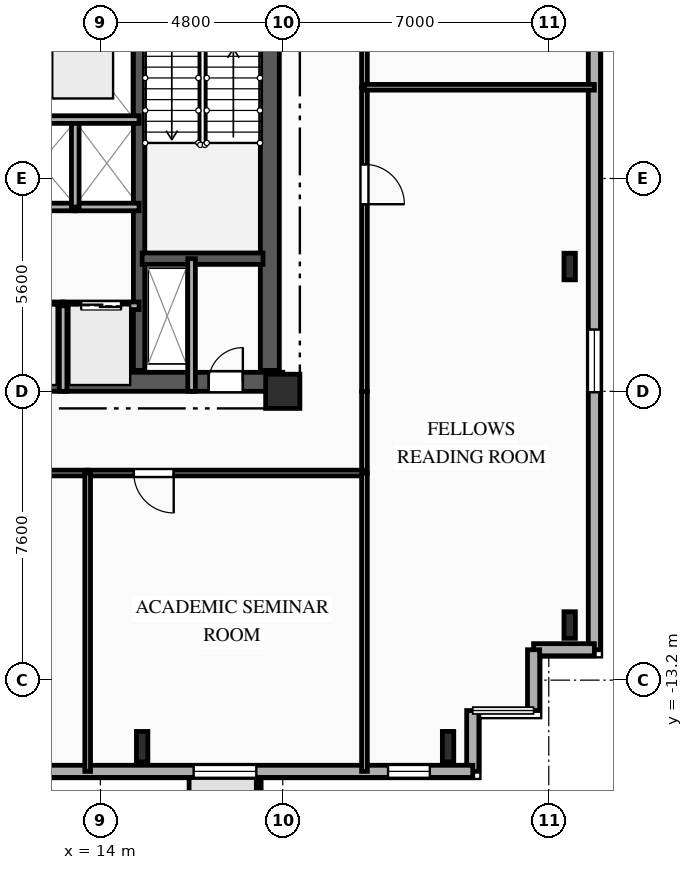
"""IFC4 building model, lengths in metres.
Left out: names, types, materials, properties, quantities, classifications, styles, units other than length and angle.
Written with IfcOpenShell. Run it as: python <this file> out.ifc"""

import sys

from ifc_helpers import new_model, si_unit, direction, frame, frame_2d, origin, origin_2d, place, context, subcontext, project, spatial, rectangle, i_section, extrude, element, fill, save


model = new_model("IFC4")
c1 = context("Model", 3, precision=1e-05, world=origin(), true_north=direction((0.0, 1.0)))
c2 = subcontext(c1, "Body", "Model", "MODEL_VIEW")
j1 = project(units=[si_unit("LENGTHUNIT", "METRE"), si_unit("PLANEANGLEUNIT", "RADIAN")], contexts=[c1])
p1 = place(None, origin())
s1 = spatial("IfcSite", under=j1, at=p1, CompositionType="ELEMENT")
p2 = place(p1, origin())
s2 = spatial("IfcBuilding", under=s1, at=p2, CompositionType="ELEMENT")
p3 = place(p2, frame((0.0, 0.0, 171.2)))
s3 = spatial("IfcBuildingStorey", under=s2, at=p3, CompositionType="ELEMENT", Elevation=171.2)
p4 = place(p3, frame((18.8, -5.6, 0.0), z_axis=(0.0, 0.0, 1.0), x_axis=(1.0, 0.0, 0.0)))
e1 = element("IfcColumn", 1, at=p4, inside=s3, PredefinedType="COLUMN", context=c2, shape_type="SweptSolid", body=[
    extrude(rectangle(XDim=0.9, YDim=0.9, at=origin_2d()), origin(), (0.0, 0.0, 1.0), 3.35),
])
for number, where, z_axis, x_axis in (
    (2, (15.1, -14.95, 0.0), (0.0, 0.0, 1.0), (1.0, 0.0, 0.0)),
    (3, (23.15, -14.95, 0.0), (0.0, 0.0, 1.0), (1.0, 0.0, 0.0)),
):
    element("IfcColumn", number, at=place(p3, frame(where, z_axis=z_axis, x_axis=x_axis)), inside=s3, PredefinedType="COLUMN", context=c2, shape_type="SweptSolid", body=[
        extrude(i_section(OverallWidth=0.3, OverallDepth=0.8, WebThickness=0.018, FlangeThickness=0.033, FilletRadius=0.03, at=origin_2d()), origin(), (0.0, 0.0, 1.0), 3.35),
    ])
for number, where, z_axis, x_axis in (
    (4, (26.35, -11.75, 0.0), (0.0, 0.0, 1.0), (1.0, 0.0, 0.0)),
    (5, (26.35, -2.317, 0.0), (0.0, 0.0, 1.0), (1.0, 0.0, 0.0)),
):
    element("IfcColumn", number, at=place(p3, frame(where, z_axis=z_axis, x_axis=x_axis)), inside=s3, PredefinedType="COLUMN", context=c2, shape_type="SweptSolid", body=[
        extrude(i_section(OverallWidth=0.3, OverallDepth=0.7, WebThickness=0.017, FlangeThickness=0.032, FilletRadius=0.027, at=origin_2d()), origin(), (0.0, 0.0, 1.0), 3.35),
    ])
p5 = place(p3, frame((27.0, 17.2, 0.0), z_axis=(0.0, 0.0, 1.0), x_axis=(0.0, -1.0, 0.0)))
e6 = element("IfcWall", 6, at=p5, inside=s3, PredefinedType="SOLIDWALL", context=c2, shape_type="SweptSolid", body=[
    extrude(rectangle(XDim=29.6, YDim=0.32, at=frame_2d((14.8, 0.0))), origin(), (0.0, 0.0, 1.0), 3.0),
])
p6 = place(p5, frame((6.815, 0.0, 0.85)))
e7 = element("IfcOpeningElement", 7, at=p6, cuts=e6, PredefinedType="OPENING", context=c2, shape_type="SweptSolid", body=[
    extrude(rectangle(XDim=1.65, YDim=1.85, at=frame_2d((0.825, 0.925))), frame((0.0, 0.17, 0.0), z_axis=(0.0, -1.0, 0.0), x_axis=(1.0, 0.0, 0.0)), (0.0, 0.0, 1.0), 0.34),
])
p7 = place(p5, frame((21.175, 0.0, 0.85)))
e8 = element("IfcOpeningElement", 8, at=p7, cuts=e6, PredefinedType="OPENING", context=c2, shape_type="SweptSolid", body=[
    extrude(rectangle(XDim=1.65, YDim=1.85, at=frame_2d((0.825, 0.925))), frame((0.0, 0.17, 0.0), z_axis=(0.0, -1.0, 0.0), x_axis=(1.0, 0.0, 0.0)), (0.0, 0.0, 1.0), 0.34),
])
for number, where, z_axis, x_axis in (
    (9, (27.0, -12.4, 0.0), (0.0, 0.0, 1.0), (-1.0, 0.0, 0.0)),
    (10, (25.4, -12.4, 0.0), (0.0, 0.0, 1.0), (0.0, -1.0, 0.0)),
    (11, (23.8, -14.0, 0.0), (0.0, 0.0, 1.0), (0.0, -1.0, 0.0)),
):
    element("IfcWall", number, at=place(p3, frame(where, z_axis=z_axis, x_axis=x_axis)), inside=s3, PredefinedType="SOLIDWALL", context=c2, shape_type="SweptSolid", body=[
        extrude(rectangle(XDim=1.6, YDim=0.32, at=frame_2d((0.8, 0.0))), origin(), (0.0, 0.0, 1.0), 3.0),
    ])
p8 = place(p3, frame((23.8, -15.6, 0.0), z_axis=(0.0, 0.0, 1.0), x_axis=(-1.0, 0.0, 0.0)))
e12 = element("IfcWall", 12, at=p8, inside=s3, PredefinedType="SOLIDWALL", context=c2, shape_type="SweptSolid", body=[
    extrude(rectangle(XDim=49.6, YDim=0.32, at=frame_2d((24.8, 0.0))), origin(), (0.0, 0.0, 1.0), 3.0),
])
p9 = place(p8, frame((1.13, 0.0, 0.85)))
e13 = element("IfcOpeningElement", 13, at=p9, cuts=e12, PredefinedType="OPENING", context=c2, shape_type="SweptSolid", body=[
    extrude(rectangle(XDim=1.1, YDim=1.85, at=frame_2d((0.55, 0.925))), frame((0.0, 0.17, 0.0), z_axis=(0.0, -1.0, 0.0), x_axis=(1.0, 0.0, 0.0)), (0.0, 0.0, 1.0), 0.34),
])
p10 = place(p8, frame((5.695, 0.0, 0.85)))
e14 = element("IfcOpeningElement", 14, at=p10, cuts=e12, PredefinedType="OPENING", context=c2, shape_type="SweptSolid", body=[
    extrude(rectangle(XDim=1.65, YDim=1.85, at=frame_2d((0.825, 0.925))), frame((0.0, 0.17, 0.0), z_axis=(0.0, -1.0, 0.0), x_axis=(1.0, 0.0, 0.0)), (0.0, 0.0, 1.0), 0.34),
])
p11 = place(p8, frame((12.975, 0.0, 0.85)))
e15 = element("IfcOpeningElement", 15, at=p11, cuts=e12, PredefinedType="OPENING", context=c2, shape_type="SweptSolid", body=[
    extrude(rectangle(XDim=1.65, YDim=1.85, at=frame_2d((0.825, 0.925))), frame((0.0, 0.17, 0.0), z_axis=(0.0, -1.0, 0.0), x_axis=(1.0, 0.0, 0.0)), (0.0, 0.0, 1.0), 0.34),
])
p12 = place(p8, frame((21.636, 0.0, 0.85)))
e16 = element("IfcOpeningElement", 16, at=p12, cuts=e12, PredefinedType="OPENING", context=c2, shape_type="SweptSolid", body=[
    extrude(rectangle(XDim=2.2, YDim=1.85, at=frame_2d((1.1, 0.925))), frame((0.0, 0.17, 0.0), z_axis=(0.0, -1.0, 0.0), x_axis=(1.0, 0.0, 0.0)), (0.0, 0.0, 1.0), 0.34),
])
p13 = place(p8, frame((33.935, 0.0, 0.85)))
e17 = element("IfcOpeningElement", 17, at=p13, cuts=e12, PredefinedType="OPENING", context=c2, shape_type="SweptSolid", body=[
    extrude(rectangle(XDim=1.65, YDim=1.85, at=frame_2d((0.825, 0.925))), frame((0.0, 0.17, 0.0), z_axis=(0.0, -1.0, 0.0), x_axis=(1.0, 0.0, 0.0)), (0.0, 0.0, 1.0), 0.34),
])
p14 = place(p8, frame((41.24, 0.0, 0.85)))
e18 = element("IfcOpeningElement", 18, at=p14, cuts=e12, PredefinedType="OPENING", context=c2, shape_type="SweptSolid", body=[
    extrude(rectangle(XDim=1.65, YDim=1.85, at=frame_2d((0.825, 0.925))), frame((0.0, 0.17, 0.0), z_axis=(0.0, -1.0, 0.0), x_axis=(1.0, 0.0, 0.0)), (0.0, 0.0, 1.0), 0.34),
])
p15 = place(p8, frame((46.175, 0.0, 0.85)))
e19 = element("IfcOpeningElement", 19, at=p15, cuts=e12, PredefinedType="OPENING", context=c2, shape_type="SweptSolid", body=[
    extrude(rectangle(XDim=1.65, YDim=1.85, at=frame_2d((0.825, 0.925))), frame((0.0, 0.17, 0.0), z_axis=(0.0, -1.0, 0.0), x_axis=(1.0, 0.0, 0.0)), (0.0, 0.0, 1.0), 0.34),
])
p16 = place(p3, frame((9.2, -5.35, 0.0), z_axis=(0.0, 0.0, 1.0), x_axis=(1.0, 0.0, 0.0)))
e20 = element("IfcWall", 20, at=p16, inside=s3, PredefinedType="SHEAR", context=c2, shape_type="SweptSolid", body=[
    extrude(rectangle(XDim=9.6, YDim=0.5, at=frame_2d((4.8, 0.0))), origin(), (0.0, 0.0, 1.0), 3.0),
])
p17 = place(p16, frame((7.65, 0.0, 0.0)))
e21 = element("IfcOpeningElement", 21, at=p17, cuts=e20, PredefinedType="OPENING", context=c2, shape_type="SweptSolid", body=[
    extrude(rectangle(XDim=0.9, YDim=2.1, at=frame_2d((0.45, 1.05))), frame((0.0, 0.26, 0.0), z_axis=(0.0, -1.0, 0.0), x_axis=(1.0, 0.0, 0.0)), (0.0, 0.0, 1.0), 0.52),
])
p18 = place(p3, frame((18.46, -5.05, 0.0), z_axis=(0.0, 0.0, 1.0), x_axis=(0.0, 1.0, 0.0)))
e22 = element("IfcWall", 22, at=p18, inside=s3, PredefinedType="SHEAR", context=c2, shape_type="SweptSolid", body=[
    extrude(rectangle(XDim=10.1, YDim=0.5, at=frame_2d((5.05, 0.0))), origin(), (0.0, 0.0, 1.0), 3.0),
])
p19 = place(p3, frame((15.02, -5.05, 0.0), z_axis=(0.0, 0.0, 1.0), x_axis=(0.0, 1.0, 0.0)))
e23 = element("IfcWall", 23, at=p19, inside=s3, PredefinedType="SHEAR", context=c2, shape_type="SweptSolid", body=[
    extrude(rectangle(XDim=10.1, YDim=0.3, at=frame_2d((5.05, 0.0))), origin(), (0.0, 0.0, 1.0), 3.0),
])
p20 = place(p3, frame((15.1, -2.11, 0.0), z_axis=(0.0, 0.0, 1.0), x_axis=(1.0, 0.0, 0.0)))
e24 = element("IfcWall", 24, at=p20, inside=s3, PredefinedType="SHEAR", context=c2, shape_type="SweptSolid", body=[
    extrude(rectangle(XDim=3.18, YDim=0.3, at=frame_2d((1.59, 0.0))), origin(), (0.0, 0.0, 1.0), 3.0),
])
p21 = place(p3, frame((16.4, -2.11, 0.0), z_axis=(0.0, 0.0, 1.0), x_axis=(0.0, -1.0, 0.0)))
e25 = element("IfcWall", 25, at=p21, inside=s3, PredefinedType="PARTITIONING", context=c2, shape_type="SweptSolid", body=[
    extrude(rectangle(XDim=3.49, YDim=0.2, at=frame_2d((1.745, 0.0))), origin(), (0.0, 0.0, 1.0), 3.0),
])
p22 = place(p3, frame((11.08, -3.35, 0.0), z_axis=(0.0, 0.0, 1.0), x_axis=(1.0, 0.0, 0.0)))
e26 = element("IfcWall", 26, at=p22, inside=s3, PredefinedType="PARTITIONING", context=c2, shape_type="SweptSolid", body=[
    extrude(rectangle(XDim=1.94, YDim=0.2, at=frame_2d((0.97, 0.0))), origin(), (0.0, 0.0, 1.0), 3.0),
])
p23 = place(p22, frame((0.445, 0.0, 0.0)))
e27 = element("IfcOpeningElement", 27, at=p23, cuts=e26, PredefinedType="OPENING", context=c2, shape_type="SweptSolid", body=[
    extrude(rectangle(XDim=1.05, YDim=2.1, at=frame_2d((0.525, 1.05))), frame((0.0, 0.11, 0.0), z_axis=(0.0, -1.0, 0.0), x_axis=(1.0, 0.0, 0.0)), (0.0, 0.0, 1.0), 0.22),
])
p24 = place(p3, frame((13.02, -3.35, 0.0), z_axis=(0.0, 0.0, 1.0), x_axis=(1.0, 0.0, 0.0)))
e28 = element("IfcWall", 28, at=p24, inside=s3, PredefinedType="PARTITIONING", context=c2, shape_type="SweptSolid", body=[
    extrude(rectangle(XDim=2.0, YDim=0.2, at=frame_2d((1.0, 0.0))), origin(), (0.0, 0.0, 1.0), 3.0),
])
p25 = place(p24, frame((0.475, 0.0, 0.0)))
e29 = element("IfcOpeningElement", 29, at=p25, cuts=e28, PredefinedType="OPENING", context=c2, shape_type="SweptSolid", body=[
    extrude(rectangle(XDim=1.05, YDim=2.1, at=frame_2d((0.525, 1.05))), frame((0.0, 0.11, 0.0), z_axis=(0.0, -1.0, 0.0), x_axis=(1.0, 0.0, 0.0)), (0.0, 0.0, 1.0), 0.22),
])
p26 = place(p3, frame((13.34, -0.75, 0.0), z_axis=(0.0, 0.0, 1.0), x_axis=(-1.0, 0.0, 0.0)))
e30 = element("IfcWall", 30, at=p26, inside=s3, PredefinedType="PARTITIONING", context=c2, shape_type="SweptSolid", body=[
    extrude(rectangle(XDim=1.88, YDim=0.2, at=frame_2d((0.94, 0.0))), origin(), (0.0, 0.0, 1.0), 3.0),
])
p27 = place(p3, frame((15.02, -0.75, 0.0), z_axis=(0.0, 0.0, 1.0), x_axis=(-1.0, 0.0, 0.0)))
e31 = element("IfcWall", 31, at=p27, inside=s3, PredefinedType="PARTITIONING", context=c2, shape_type="SweptSolid", body=[
    extrude(rectangle(XDim=1.68, YDim=0.2, at=frame_2d((0.84, 0.0))), origin(), (0.0, 0.0, 1.0), 3.0),
])
p28 = place(p3, frame((13.02, -5.6, 0.0), z_axis=(0.0, 0.0, 1.0), x_axis=(0.0, 1.0, 0.0)))
e32 = element("IfcWall", 32, at=p28, inside=s3, PredefinedType="PARTITIONING", context=c2, shape_type="SweptSolid", body=[
    extrude(rectangle(XDim=2.25, YDim=0.2, at=frame_2d((1.125, 0.0))), origin(), (0.0, 0.0, 1.0), 3.0),
])
p29 = place(p3, frame((13.34, -0.75, 0.0), z_axis=(0.0, 0.0, 1.0), x_axis=(0.0, 1.0, 0.0)))
e33 = element("IfcWall", 33, at=p29, inside=s3, PredefinedType="PARTITIONING", context=c2, shape_type="SweptSolid", body=[
    extrude(rectangle(XDim=2.3, YDim=0.2, at=frame_2d((1.15, 0.0))), origin(), (0.0, 0.0, 1.0), 3.0),
])
p30 = place(p3, frame((20.95, -5.6, 0.0), z_axis=(0.0, 0.0, 1.0), x_axis=(0.0, -1.0, 0.0)))
e34 = element("IfcWall", 34, at=p30, inside=s3, PredefinedType="PARTITIONING", context=c2, shape_type="SweptSolid", body=[
    extrude(rectangle(XDim=2.15, YDim=0.15, at=frame_2d((1.075, 0.0))), origin(), (0.0, 0.0, 1.0), 3.0),
])
p31 = place(p3, frame((13.667, -7.75, 0.0), z_axis=(0.0, 0.0, 1.0), x_axis=(-1.0, 0.0, 0.0)))
e35 = element("IfcWall", 35, at=p31, inside=s3, PredefinedType="PARTITIONING", context=c2, shape_type="SweptSolid", body=[
    extrude(rectangle(XDim=7.283, YDim=0.15, at=frame_2d((3.642, 0.0))), origin(), (0.0, 0.0, 1.0), 3.0),
])
p32 = place(p31, frame((1.214, 0.0, 0.0)))
e36 = element("IfcOpeningElement", 36, at=p32, cuts=e35, PredefinedType="OPENING", context=c2, shape_type="SweptSolid", body=[
    extrude(rectangle(XDim=1.05, YDim=2.15, at=frame_2d((0.525, 1.075))), frame((0.0, 0.085, 0.0), z_axis=(0.0, -1.0, 0.0), x_axis=(1.0, 0.0, 0.0)), (0.0, 0.0, 1.0), 0.17),
])
p33 = place(p3, frame((20.95, -7.75, 0.0), z_axis=(0.0, 0.0, 1.0), x_axis=(-1.0, 0.0, 0.0)))
e37 = element("IfcWall", 37, at=p33, inside=s3, PredefinedType="PARTITIONING", context=c2, shape_type="SweptSolid", body=[
    extrude(rectangle(XDim=7.283, YDim=0.15, at=frame_2d((3.642, 0.0))), origin(), (0.0, 0.0, 1.0), 3.0),
])
p34 = place(p33, frame((5.019, 0.0, 0.0)))
e38 = element("IfcOpeningElement", 38, at=p34, cuts=e37, PredefinedType="OPENING", context=c2, shape_type="SweptSolid", body=[
    extrude(rectangle(XDim=1.05, YDim=2.15, at=frame_2d((0.525, 1.075))), frame((0.0, 0.085, 0.0), z_axis=(0.0, -1.0, 0.0), x_axis=(1.0, 0.0, 0.0)), (0.0, 0.0, 1.0), 0.17),
])
p35 = place(p3, frame((20.95, 2.4, 0.0), z_axis=(0.0, 0.0, 1.0), x_axis=(0.0, -1.0, 0.0)))
e39 = element("IfcWall", 39, at=p35, inside=s3, PredefinedType="PARTITIONING", context=c2, shape_type="SweptSolid", body=[
    extrude(rectangle(XDim=8.0, YDim=0.15, at=frame_2d((4.0, 0.0))), origin(), (0.0, 0.0, 1.0), 3.0),
])
p36 = place(p35, frame((2.028, 0.0, 0.0)))
e40 = element("IfcOpeningElement", 40, at=p36, cuts=e39, PredefinedType="OPENING", context=c2, shape_type="SweptSolid", body=[
    extrude(rectangle(XDim=1.05, YDim=2.15, at=frame_2d((0.525, 1.075))), frame((0.0, 0.085, 0.0), z_axis=(0.0, -1.0, 0.0), x_axis=(1.0, 0.0, 0.0)), (0.0, 0.0, 1.0), 0.17),
])
p37 = place(p3, frame((20.95, 8.5, 0.0), z_axis=(0.0, 0.0, 1.0), x_axis=(0.0, -1.0, 0.0)))
e41 = element("IfcWall", 41, at=p37, inside=s3, PredefinedType="PARTITIONING", context=c2, shape_type="SweptSolid", body=[
    extrude(rectangle(XDim=6.1, YDim=0.15, at=frame_2d((3.05, 0.0))), origin(), (0.0, 0.0, 1.0), 3.0),
])
p38 = place(p37, frame((3.984, 0.0, 0.0)))
e42 = element("IfcOpeningElement", 42, at=p38, cuts=e41, PredefinedType="OPENING", context=c2, shape_type="SweptSolid", body=[
    extrude(rectangle(XDim=1.05, YDim=2.15, at=frame_2d((0.525, 1.075))), frame((0.0, 0.085, 0.0), z_axis=(0.0, -1.0, 0.0), x_axis=(1.0, 0.0, 0.0)), (0.0, 0.0, 1.0), 0.17),
])
p39 = place(p3, frame((20.95, 2.4, 0.0), z_axis=(0.0, 0.0, 1.0), x_axis=(1.0, 0.0, 0.0)))
e43 = element("IfcWall", 43, at=p39, inside=s3, PredefinedType="PARTITIONING", context=c2, shape_type="SweptSolid", body=[
    extrude(rectangle(XDim=6.05, YDim=0.15, at=frame_2d((3.025, 0.0))), origin(), (0.0, 0.0, 1.0), 3.0),
])
for number, where, z_axis, x_axis in (
    (44, (20.95, -15.6, 0.0), (0.0, 0.0, 1.0), (0.0, 1.0, 0.0)),
    (45, (13.667, -7.75, 0.0), (0.0, 0.0, 1.0), (0.0, -1.0, 0.0)),
):
    element("IfcWall", number, at=place(p3, frame(where, z_axis=z_axis, x_axis=x_axis)), inside=s3, PredefinedType="PARTITIONING", context=c2, shape_type="SweptSolid", body=[
        extrude(rectangle(XDim=7.85, YDim=0.15, at=frame_2d((3.925, 0.0))), origin(), (0.0, 0.0, 1.0), 3.0),
    ])
p40 = place(p3, frame((9.2, 1.55, 0.0), z_axis=(0.0, 0.0, 1.0), x_axis=(1.0, 0.0, 0.0)))
e46 = element("IfcWall", 46, at=p40, inside=s3, PredefinedType="PARTITIONING", context=c2, shape_type="SweptSolid", body=[
    extrude(rectangle(XDim=5.82, YDim=0.2, at=frame_2d((2.91, 0.0))), origin(), (0.0, 0.0, 1.0), 3.0),
])
p41 = place(p7, origin())
e47 = element("IfcWindow", 47, at=p41, inside=s3, PartitioningType="SINGLE_PANEL", PredefinedType="WINDOW", context=c2, shape_type="SweptSolid", body=[
    extrude(rectangle(XDim=1.65, YDim=1.85, at=frame_2d((0.825, 0.925))), frame((0.0, 0.03, 0.0), z_axis=(0.0, -1.0, 0.0), x_axis=(1.0, 0.0, 0.0)), (0.0, 0.0, 1.0), 0.06),
])
fill(e8, e47)
p42 = place(p9, origin())
e48 = element("IfcWindow", 48, at=p42, inside=s3, PartitioningType="SINGLE_PANEL", PredefinedType="WINDOW", context=c2, shape_type="SweptSolid", body=[
    extrude(rectangle(XDim=1.1, YDim=1.85, at=frame_2d((0.55, 0.925))), frame((0.0, 0.03, 0.0), z_axis=(0.0, -1.0, 0.0), x_axis=(1.0, 0.0, 0.0)), (0.0, 0.0, 1.0), 0.06),
])
fill(e13, e48)
p43 = place(p10, origin())
e49 = element("IfcWindow", 49, at=p43, inside=s3, PartitioningType="SINGLE_PANEL", PredefinedType="WINDOW", context=c2, shape_type="SweptSolid", body=[
    extrude(rectangle(XDim=1.65, YDim=1.85, at=frame_2d((0.825, 0.925))), frame((0.0, 0.03, 0.0), z_axis=(0.0, -1.0, 0.0), x_axis=(1.0, 0.0, 0.0)), (0.0, 0.0, 1.0), 0.06),
])
fill(e14, e49)
p44 = place(p17, origin())
e50 = element("IfcDoor", 50, at=p44, inside=s3, OperationType="SINGLE_SWING_RIGHT", PredefinedType="DOOR", context=c2, shape_type="SweptSolid", body=[
    extrude(rectangle(XDim=0.9, YDim=2.1, at=frame_2d((0.45, 1.05))), frame((0.0, 0.025, 0.0), z_axis=(0.0, -1.0, 0.0), x_axis=(1.0, 0.0, 0.0)), (0.0, 0.0, 1.0), 0.05),
])
fill(e21, e50)
p45 = place(p25, origin())
e51 = element("IfcDoor", 51, at=p45, inside=s3, OperationType="DOUBLE_DOOR_SLIDING", PredefinedType="DOOR", context=c2, shape_type="SweptSolid", body=[
    extrude(rectangle(XDim=1.05, YDim=2.1, at=frame_2d((0.525, 1.05))), frame((0.0, 0.025, 0.0), z_axis=(0.0, -1.0, 0.0), x_axis=(1.0, 0.0, 0.0)), (0.0, 0.0, 1.0), 0.05),
])
fill(e29, e51)
p46 = place(p34, origin())
e52 = element("IfcDoor", 52, at=p46, inside=s3, OperationType="SINGLE_SWING_LEFT", PredefinedType="DOOR", context=c2, shape_type="SweptSolid", body=[
    extrude(rectangle(XDim=1.05, YDim=2.15, at=frame_2d((0.525, 1.075))), frame((0.0, 0.025, 0.0), z_axis=(0.0, -1.0, 0.0), x_axis=(1.0, 0.0, 0.0)), (0.0, 0.0, 1.0), 0.05),
])
fill(e38, e52)
p47 = place(p36, origin())
e53 = element("IfcDoor", 53, at=p47, inside=s3, OperationType="SINGLE_SWING_RIGHT", PredefinedType="DOOR", context=c2, shape_type="SweptSolid", body=[
    extrude(rectangle(XDim=1.05, YDim=2.15, at=frame_2d((0.525, 1.075))), frame((0.0, 0.025, 0.0), z_axis=(0.0, -1.0, 0.0), x_axis=(1.0, 0.0, 0.0)), (0.0, 0.0, 1.0), 0.05),
])
fill(e40, e53)
save(model, sys.argv[1])
